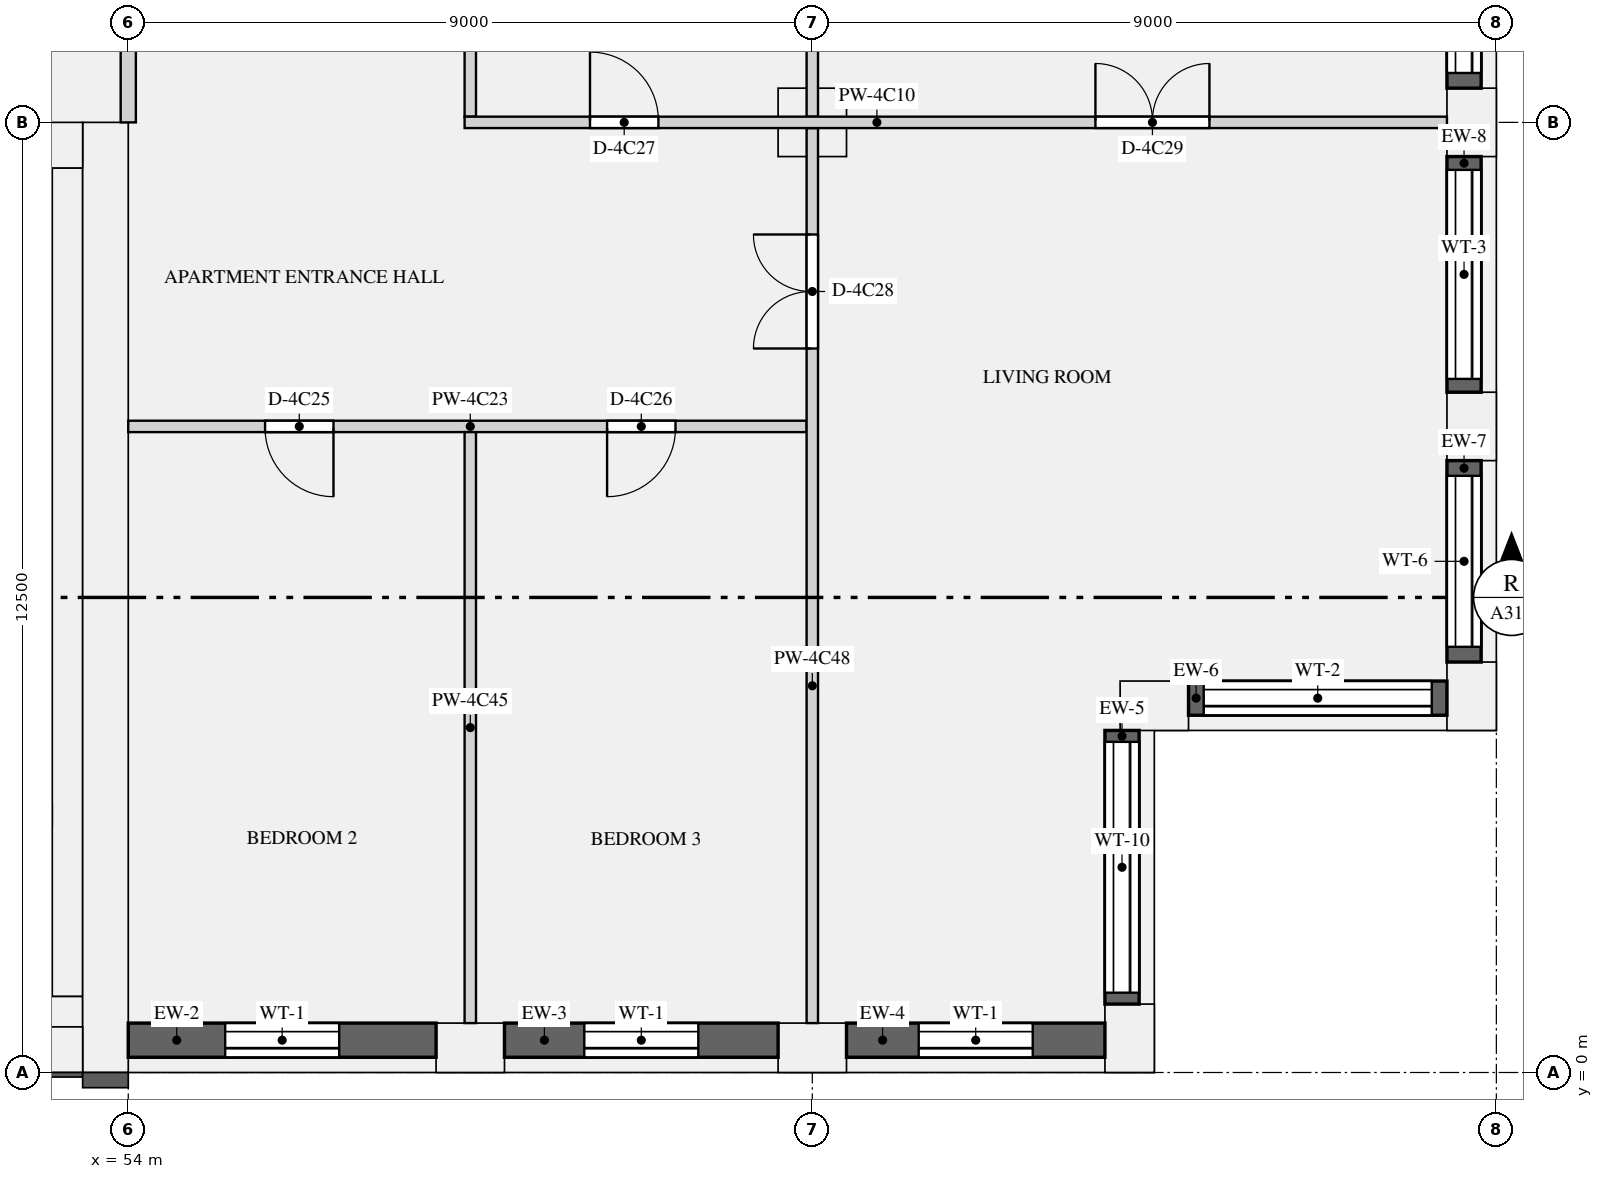
"""IFC4 building model, lengths in metres.
Left out: names, types, materials, properties, quantities, classifications, styles, units other than length and angle.
Written with IfcOpenShell. Run it as: python <this file> out.ifc"""

import sys

from ifc_helpers import new_model, si_unit, direction, frame, frame_2d, origin, origin_2d, place, context, subcontext, project, spatial, rectangle, extrude, element, fill, save


model = new_model("IFC4")
c1 = context("Model", 3, precision=1e-05, world=origin(), true_north=direction((0.0, 1.0)))
c2 = subcontext(c1, "Body", "Model", "MODEL_VIEW")
j1 = project(units=[si_unit("LENGTHUNIT", "METRE"), si_unit("PLANEANGLEUNIT", "RADIAN")], contexts=[c1])
p1 = place(None, origin())
s1 = spatial("IfcSite", under=j1, at=p1, CompositionType="ELEMENT")
p2 = place(p1, origin())
s2 = spatial("IfcBuilding", under=s1, at=p2, CompositionType="ELEMENT")
p3 = place(p2, frame((0.0, 0.0, 216.9)))
s3 = spatial("IfcBuildingStorey", under=s2, at=p3, CompositionType="ELEMENT", Elevation=216.9)
for number, where, z_axis, x_axis in (
    (1, (58.5, 0.325, 0.0), (0.0, 0.0, 1.0), (1.0, 0.0, 0.0)),
    (2, (63.0, 0.325, 0.0), (0.0, 0.0, 1.0), (1.0, 0.0, 0.0)),
    (3, (67.175, 0.45, 0.0), (0.0, 0.0, 1.0), (0.0, 1.0, 0.0)),
    (4, (67.5, 4.825, 0.0), (0.0, 0.0, 1.0), (1.0, 0.0, 0.0)),
    (5, (71.675, 4.95, 0.0), (0.0, 0.0, 1.0), (0.0, 1.0, 0.0)),
    (6, (71.675, 8.5, 0.0), (0.0, 0.0, 1.0), (0.0, 1.0, 0.0)),
    (7, (71.675, 12.5, 0.0), (0.0, 0.0, 1.0), (0.0, 1.0, 0.0)),
):
    element("IfcColumn", number, at=place(p3, frame(where, z_axis=z_axis, x_axis=x_axis)), inside=s3, PredefinedType="USERDEFINED", context=c2, shape_type="SweptSolid", body=[
        extrude(rectangle(XDim=0.9, YDim=0.65, at=origin_2d()), origin(), (0.0, 0.0, 1.0), 3.15),
    ])
p4 = place(p3, frame((63.0, 12.5, 0.0), z_axis=(0.0, 0.0, 1.0), x_axis=(1.0, 0.0, 0.0)))
e8 = element("IfcColumn", 8, at=p4, inside=s3, PredefinedType="COLUMN", context=c2, shape_type="SweptSolid", body=[
    extrude(rectangle(XDim=0.9, YDim=0.9, at=origin_2d()), origin(), (0.0, 0.0, 1.0), 3.15),
])
p5 = place(p3, frame((53.7, 0.0, 0.0), z_axis=(0.0, 0.0, 1.0), x_axis=(0.0, 1.0, 0.0)))
e9 = element("IfcWall", 9, at=p5, inside=s3, PredefinedType="SHEAR", context=c2, shape_type="SweptSolid", body=[
    extrude(rectangle(XDim=12.5, YDim=0.6, at=frame_2d((6.25, 0.0))), origin(), (0.0, 0.0, 1.0), 3.15),
])
p6 = place(p3, frame((18.6, 0.3, 0.0), z_axis=(0.0, 0.0, 1.0), x_axis=(1.0, 0.0, 0.0)))
e10 = element("IfcWall", 10, at=p6, inside=s3, PredefinedType="SHEAR", context=c2, shape_type="SweptSolid", body=[
    extrude(rectangle(XDim=34.8, YDim=0.6, at=frame_2d((17.4, 0.0))), origin(), (0.0, 0.0, 1.0), 3.15),
])
p7 = place(p3, frame((18.6, 12.2, 0.0), z_axis=(0.0, 0.0, 1.0), x_axis=(1.0, 0.0, 0.0)))
e11 = element("IfcWall", 11, at=p7, inside=s3, PredefinedType="SHEAR", context=c2, shape_type="SweptSolid", body=[
    extrude(rectangle(XDim=34.8, YDim=0.6, at=frame_2d((17.4, 0.0))), origin(), (0.0, 0.0, 1.0), 3.15),
])
p8 = place(p7, frame((24.575, 0.0, 0.0)))
e12 = element("IfcOpeningElement", 12, at=p8, cuts=e11, PredefinedType="OPENING", context=c2, shape_type="SweptSolid", body=[
    extrude(rectangle(XDim=1.1, YDim=2.1, at=frame_2d((0.55, 1.05))), frame((0.0, 0.31, 0.0), z_axis=(0.0, -1.0, 0.0), x_axis=(1.0, 0.0, 0.0)), (0.0, 0.0, 1.0), 0.62),
])
p9 = place(p7, frame((26.825, 0.0, 0.0)))
e13 = element("IfcOpeningElement", 13, at=p9, cuts=e11, PredefinedType="OPENING", context=c2, shape_type="SweptSolid", body=[
    extrude(rectangle(XDim=1.1, YDim=2.1, at=frame_2d((0.55, 1.05))), frame((0.0, 0.31, 0.0), z_axis=(0.0, -1.0, 0.0), x_axis=(1.0, 0.0, 0.0)), (0.0, 0.0, 1.0), 0.62),
])
p10 = place(p7, frame((29.075, 0.0, 0.0)))
e14 = element("IfcOpeningElement", 14, at=p10, cuts=e11, PredefinedType="OPENING", context=c2, shape_type="SweptSolid", body=[
    extrude(rectangle(XDim=1.1, YDim=2.1, at=frame_2d((0.55, 1.05))), frame((0.0, 0.31, 0.0), z_axis=(0.0, -1.0, 0.0), x_axis=(1.0, 0.0, 0.0)), (0.0, 0.0, 1.0), 0.62),
])
p11 = place(p7, frame((8.95, 0.0, 0.0)))
e15 = element("IfcOpeningElement", 15, at=p11, cuts=e11, PredefinedType="OPENING", context=c2, shape_type="SweptSolid", body=[
    extrude(rectangle(XDim=0.9, YDim=2.1, at=frame_2d((0.45, 1.05))), frame((0.0, 0.31, 0.0), z_axis=(0.0, -1.0, 0.0), x_axis=(1.0, 0.0, 0.0)), (0.0, 0.0, 1.0), 0.62),
])
p12 = place(p7, frame((1.55, 0.0, 0.0)))
e16 = element("IfcOpeningElement", 16, at=p12, cuts=e11, PredefinedType="OPENING", context=c2, shape_type="SweptSolid", body=[
    extrude(rectangle(XDim=1.2, YDim=2.1, at=frame_2d((0.6, 1.05))), frame((0.0, 0.31, 0.0), z_axis=(0.0, -1.0, 0.0), x_axis=(1.0, 0.0, 0.0)), (0.0, 0.0, 1.0), 0.62),
])
p13 = place(p7, frame((32.05, 0.0, 0.0)))
e17 = element("IfcOpeningElement", 17, at=p13, cuts=e11, PredefinedType="OPENING", context=c2, shape_type="SweptSolid", body=[
    extrude(rectangle(XDim=1.2, YDim=2.1, at=frame_2d((0.6, 1.05))), frame((0.0, 0.31, 0.0), z_axis=(0.0, -1.0, 0.0), x_axis=(1.0, 0.0, 0.0)), (0.0, 0.0, 1.0), 0.62),
])
p14 = place(p3, frame((53.2, 1.0, 0.0), z_axis=(0.0, 0.0, 1.0), x_axis=(0.0, 1.0, 0.0)))
e18 = element("IfcWall", 18, at=p14, inside=s3, PredefinedType="SHEAR", context=c2, shape_type="SweptSolid", body=[
    extrude(rectangle(XDim=10.9, YDim=0.4, at=frame_2d((5.45, 0.0))), origin(), (0.0, 0.0, 1.0), 3.15),
])
p15 = place(p3, frame((18.6, 0.8, 0.0), z_axis=(0.0, 0.0, 1.0), x_axis=(1.0, 0.0, 0.0)))
e19 = element("IfcWall", 19, at=p15, inside=s3, PredefinedType="SHEAR", context=c2, shape_type="SweptSolid", body=[
    extrude(rectangle(XDim=34.8, YDim=0.4, at=frame_2d((17.4, 0.0))), origin(), (0.0, 0.0, 1.0), 3.15),
])
p16 = place(p3, frame((54.0, 0.425, 0.9), z_axis=(0.0, 0.0, 1.0), x_axis=(1.0, 0.0, 0.0)))
e20 = element("IfcWall", 20, at=p16, inside=s3, PredefinedType="SOLIDWALL", context=c2, shape_type="SweptSolid", body=[
    extrude(rectangle(XDim=4.05, YDim=0.45, at=frame_2d((2.025, 0.0))), origin(), (0.0, 0.0, 1.0), 1.93),
])
p17 = place(p16, frame((1.275, 0.0, 0.15)))
e21 = element("IfcOpeningElement", 21, at=p17, cuts=e20, PredefinedType="OPENING", context=c2, shape_type="SweptSolid", body=[
    extrude(rectangle(XDim=1.5, YDim=1.5, at=frame_2d((0.75, 0.75))), frame((0.0, 0.235, 0.0), z_axis=(0.0, -1.0, 0.0), x_axis=(1.0, 0.0, 0.0)), (0.0, 0.0, 1.0), 0.47),
])
p18 = place(p3, frame((58.95, 0.425, 0.9), z_axis=(0.0, 0.0, 1.0), x_axis=(1.0, 0.0, 0.0)))
e22 = element("IfcWall", 22, at=p18, inside=s3, PredefinedType="SOLIDWALL", context=c2, shape_type="SweptSolid", body=[
    extrude(rectangle(XDim=3.6, YDim=0.45, at=frame_2d((1.8, 0.0))), origin(), (0.0, 0.0, 1.0), 1.93),
])
p19 = place(p18, frame((1.05, 0.0, 0.15)))
e23 = element("IfcOpeningElement", 23, at=p19, cuts=e22, PredefinedType="OPENING", context=c2, shape_type="SweptSolid", body=[
    extrude(rectangle(XDim=1.5, YDim=1.5, at=frame_2d((0.75, 0.75))), frame((0.0, 0.235, 0.0), z_axis=(0.0, -1.0, 0.0), x_axis=(1.0, 0.0, 0.0)), (0.0, 0.0, 1.0), 0.47),
])
p20 = place(p3, frame((63.45, 0.425, 0.9), z_axis=(0.0, 0.0, 1.0), x_axis=(1.0, 0.0, 0.0)))
e24 = element("IfcWall", 24, at=p20, inside=s3, PredefinedType="SOLIDWALL", context=c2, shape_type="SweptSolid", body=[
    extrude(rectangle(XDim=3.4, YDim=0.45, at=frame_2d((1.7, 0.0))), origin(), (0.0, 0.0, 1.0), 1.93),
])
p21 = place(p20, frame((0.95, 0.0, 0.15)))
e25 = element("IfcOpeningElement", 25, at=p21, cuts=e24, PredefinedType="OPENING", context=c2, shape_type="SweptSolid", body=[
    extrude(rectangle(XDim=1.5, YDim=1.5, at=frame_2d((0.75, 0.75))), frame((0.0, 0.235, 0.0), z_axis=(0.0, -1.0, 0.0), x_axis=(1.0, 0.0, 0.0)), (0.0, 0.0, 1.0), 0.47),
])
p22 = place(p3, frame((67.075, 0.9, 0.9), z_axis=(0.0, 0.0, 1.0), x_axis=(0.0, 1.0, 0.0)))
e26 = element("IfcWall", 26, at=p22, inside=s3, PredefinedType="SOLIDWALL", context=c2, shape_type="SweptSolid", body=[
    extrude(rectangle(XDim=3.6, YDim=0.45, at=frame_2d((1.8, 0.0))), origin(), (0.0, 0.0, 1.0), 1.93),
])
p23 = place(p22, frame((0.15, 0.0, 0.15)))
e27 = element("IfcOpeningElement", 27, at=p23, cuts=e26, PredefinedType="OPENING", context=c2, shape_type="SweptSolid", body=[
    extrude(rectangle(XDim=3.3, YDim=1.5, at=frame_2d((1.65, 0.75))), frame((0.0, 0.235, 0.0), z_axis=(0.0, -1.0, 0.0), x_axis=(1.0, 0.0, 0.0)), (0.0, 0.0, 1.0), 0.47),
])
p24 = place(p3, frame((67.95, 4.925, 0.9), z_axis=(0.0, 0.0, 1.0), x_axis=(1.0, 0.0, 0.0)))
e28 = element("IfcWall", 28, at=p24, inside=s3, PredefinedType="SOLIDWALL", context=c2, shape_type="SweptSolid", body=[
    extrude(rectangle(XDim=3.4, YDim=0.45, at=frame_2d((1.7, 0.0))), origin(), (0.0, 0.0, 1.0), 1.93),
])
p25 = place(p24, frame((0.2, 0.0, 0.15)))
e29 = element("IfcOpeningElement", 29, at=p25, cuts=e28, PredefinedType="OPENING", context=c2, shape_type="SweptSolid", body=[
    extrude(rectangle(XDim=3.0, YDim=1.5, at=frame_2d((1.5, 0.75))), frame((0.0, 0.235, 0.0), z_axis=(0.0, -1.0, 0.0), x_axis=(1.0, 0.0, 0.0)), (0.0, 0.0, 1.0), 0.47),
])
p26 = place(p3, frame((71.575, 5.4, 0.9), z_axis=(0.0, 0.0, 1.0), x_axis=(0.0, 1.0, 0.0)))
e30 = element("IfcWall", 30, at=p26, inside=s3, PredefinedType="SOLIDWALL", context=c2, shape_type="SweptSolid", body=[
    extrude(rectangle(XDim=2.65, YDim=0.45, at=frame_2d((1.325, 0.0))), origin(), (0.0, 0.0, 1.0), 1.93),
])
p27 = place(p26, frame((0.2, 0.0, 0.15)))
e31 = element("IfcOpeningElement", 31, at=p27, cuts=e30, PredefinedType="OPENING", context=c2, shape_type="SweptSolid", body=[
    extrude(rectangle(XDim=2.25, YDim=1.5, at=frame_2d((1.125, 0.75))), frame((0.0, 0.235, 0.0), z_axis=(0.0, -1.0, 0.0), x_axis=(1.0, 0.0, 0.0)), (0.0, 0.0, 1.0), 0.47),
])
p28 = place(p3, frame((71.575, 8.95, 0.9), z_axis=(0.0, 0.0, 1.0), x_axis=(0.0, 1.0, 0.0)))
e32 = element("IfcWall", 32, at=p28, inside=s3, PredefinedType="SOLIDWALL", context=c2, shape_type="SweptSolid", body=[
    extrude(rectangle(XDim=3.1, YDim=0.45, at=frame_2d((1.55, 0.0))), origin(), (0.0, 0.0, 1.0), 1.93),
])
p29 = place(p28, frame((0.175, 0.0, 0.15)))
e33 = element("IfcOpeningElement", 33, at=p29, cuts=e32, PredefinedType="OPENING", context=c2, shape_type="SweptSolid", body=[
    extrude(rectangle(XDim=2.75, YDim=1.5, at=frame_2d((1.375, 0.75))), frame((0.0, 0.235, 0.0), z_axis=(0.0, -1.0, 0.0), x_axis=(1.0, 0.0, 0.0)), (0.0, 0.0, 1.0), 0.47),
])
p30 = place(p3, frame((71.575, 12.95, 0.9), z_axis=(0.0, 0.0, 1.0), x_axis=(0.0, 1.0, 0.0)))
e34 = element("IfcWall", 34, at=p30, inside=s3, PredefinedType="SOLIDWALL", context=c2, shape_type="SweptSolid", body=[
    extrude(rectangle(XDim=2.9, YDim=0.45, at=frame_2d((1.45, 0.0))), origin(), (0.0, 0.0, 1.0), 1.93),
])
p31 = place(p30, frame((0.2, 0.0, 0.15)))
e35 = element("IfcOpeningElement", 35, at=p31, cuts=e34, PredefinedType="OPENING", context=c2, shape_type="SweptSolid", body=[
    extrude(rectangle(XDim=2.5, YDim=1.5, at=frame_2d((1.25, 0.75))), frame((0.0, 0.235, 0.0), z_axis=(0.0, -1.0, 0.0), x_axis=(1.0, 0.0, 0.0)), (0.0, 0.0, 1.0), 0.47),
])
p32 = place(p3, frame((54.0, 12.5, 0.0), z_axis=(0.0, 0.0, 1.0), x_axis=(0.0, 1.0, 0.0)))
e36 = element("IfcWall", 36, at=p32, inside=s3, PredefinedType="PARTITIONING", context=c2, shape_type="SweptSolid", body=[
    extrude(rectangle(XDim=3.4, YDim=0.2, at=frame_2d((1.7, 0.0))), origin(), (0.0, 0.0, 1.0), 2.83),
])
p33 = place(p3, frame((58.425, 12.5, 0.0), z_axis=(0.0, 0.0, 1.0), x_axis=(1.0, 0.0, 0.0)))
e37 = element("IfcWall", 37, at=p33, inside=s3, PredefinedType="PARTITIONING", context=c2, shape_type="SweptSolid", body=[
    extrude(rectangle(XDim=12.925, YDim=0.15, at=frame_2d((6.462, 0.0))), origin(), (0.0, 0.0, 1.0), 2.83),
])
p34 = place(p33, frame((1.65, 0.0, 0.0)))
e38 = element("IfcOpeningElement", 38, at=p34, cuts=e37, PredefinedType="OPENING", context=c2, shape_type="SweptSolid", body=[
    extrude(rectangle(XDim=0.9, YDim=2.1, at=frame_2d((0.45, 1.05))), frame((0.0, 0.085, 0.0), z_axis=(0.0, -1.0, 0.0), x_axis=(1.0, 0.0, 0.0)), (0.0, 0.0, 1.0), 0.17),
])
p35 = place(p33, frame((8.3, 0.0, 0.0)))
e39 = element("IfcOpeningElement", 39, at=p35, cuts=e37, PredefinedType="OPENING", context=c2, shape_type="SweptSolid", body=[
    extrude(rectangle(XDim=1.5, YDim=2.1, at=frame_2d((0.75, 1.05))), frame((0.0, 0.085, 0.0), z_axis=(0.0, -1.0, 0.0), x_axis=(1.0, 0.0, 0.0)), (0.0, 0.0, 1.0), 0.17),
])
p36 = place(p3, frame((54.0, 8.5, 0.0), z_axis=(0.0, 0.0, 1.0), x_axis=(1.0, 0.0, 0.0)))
e40 = element("IfcWall", 40, at=p36, inside=s3, PredefinedType="PARTITIONING", context=c2, shape_type="SweptSolid", body=[
    extrude(rectangle(XDim=8.925, YDim=0.15, at=frame_2d((4.462, 0.0))), origin(), (0.0, 0.0, 1.0), 2.83),
])
p37 = place(p36, frame((1.8, 0.0, 0.0)))
e41 = element("IfcOpeningElement", 41, at=p37, cuts=e40, PredefinedType="OPENING", context=c2, shape_type="SweptSolid", body=[
    extrude(rectangle(XDim=0.9, YDim=2.1, at=frame_2d((0.45, 1.05))), frame((0.0, 0.085, 0.0), z_axis=(0.0, -1.0, 0.0), x_axis=(1.0, 0.0, 0.0)), (0.0, 0.0, 1.0), 0.17),
])
p38 = place(p36, frame((6.3, 0.0, 0.0)))
e42 = element("IfcOpeningElement", 42, at=p38, cuts=e40, PredefinedType="OPENING", context=c2, shape_type="SweptSolid", body=[
    extrude(rectangle(XDim=0.9, YDim=2.1, at=frame_2d((0.45, 1.05))), frame((0.0, 0.085, 0.0), z_axis=(0.0, -1.0, 0.0), x_axis=(1.0, 0.0, 0.0)), (0.0, 0.0, 1.0), 0.17),
])
p39 = place(p3, frame((58.5, 0.65, 0.0), z_axis=(0.0, 0.0, 1.0), x_axis=(0.0, 1.0, 0.0)))
e43 = element("IfcWall", 43, at=p39, inside=s3, PredefinedType="PARTITIONING", context=c2, shape_type="SweptSolid", body=[
    extrude(rectangle(XDim=7.775, YDim=0.15, at=frame_2d((3.888, 0.0))), origin(), (0.0, 0.0, 1.0), 2.83),
])
p40 = place(p3, frame((58.5, 12.575, 0.0), z_axis=(0.0, 0.0, 1.0), x_axis=(0.0, 1.0, 0.0)))
e44 = element("IfcWall", 44, at=p40, inside=s3, PredefinedType="PARTITIONING", context=c2, shape_type="SweptSolid", body=[
    extrude(rectangle(XDim=3.85, YDim=0.15, at=frame_2d((1.925, 0.0))), origin(), (0.0, 0.0, 1.0), 2.83),
])
p41 = place(p3, frame((63.0, 0.65, 0.0), z_axis=(0.0, 0.0, 1.0), x_axis=(0.0, 1.0, 0.0)))
e45 = element("IfcWall", 45, at=p41, inside=s3, PredefinedType="PARTITIONING", context=c2, shape_type="SweptSolid", body=[
    extrude(rectangle(XDim=11.775, YDim=0.15, at=frame_2d((5.888, 0.0))), origin(), (0.0, 0.0, 1.0), 2.83),
])
p42 = place(p41, frame((8.875, 0.0, 0.0)))
e46 = element("IfcOpeningElement", 46, at=p42, cuts=e45, PredefinedType="OPENING", context=c2, shape_type="SweptSolid", body=[
    extrude(rectangle(XDim=1.5, YDim=2.1, at=frame_2d((0.75, 1.05))), frame((0.0, 0.085, 0.0), z_axis=(0.0, -1.0, 0.0), x_axis=(1.0, 0.0, 0.0)), (0.0, 0.0, 1.0), 0.17),
])
p43 = place(p3, frame((63.0, 12.575, 0.0), z_axis=(0.0, 0.0, 1.0), x_axis=(0.0, 1.0, 0.0)))
e47 = element("IfcWall", 47, at=p43, inside=s3, PredefinedType="PARTITIONING", context=c2, shape_type="SweptSolid", body=[
    extrude(rectangle(XDim=3.85, YDim=0.15, at=frame_2d((1.925, 0.0))), origin(), (0.0, 0.0, 1.0), 2.83),
])
p44 = place(p17, origin())
e48 = element("IfcWindow", 48, at=p44, inside=s3, PartitioningType="SINGLE_PANEL", PredefinedType="WINDOW", context=c2, shape_type="SweptSolid", body=[
    extrude(rectangle(XDim=1.5, YDim=1.5, at=frame_2d((0.75, 0.75))), frame((0.0, -0.065, 0.0), z_axis=(0.0, -1.0, 0.0), x_axis=(1.0, 0.0, 0.0)), (0.0, 0.0, 1.0), 0.06),
])
fill(e21, e48)
p45 = place(p19, origin())
e49 = element("IfcWindow", 49, at=p45, inside=s3, PartitioningType="SINGLE_PANEL", PredefinedType="WINDOW", context=c2, shape_type="SweptSolid", body=[
    extrude(rectangle(XDim=1.5, YDim=1.5, at=frame_2d((0.75, 0.75))), frame((0.0, -0.065, 0.0), z_axis=(0.0, -1.0, 0.0), x_axis=(1.0, 0.0, 0.0)), (0.0, 0.0, 1.0), 0.06),
])
fill(e23, e49)
p46 = place(p21, origin())
e50 = element("IfcWindow", 50, at=p46, inside=s3, PartitioningType="SINGLE_PANEL", PredefinedType="WINDOW", context=c2, shape_type="SweptSolid", body=[
    extrude(rectangle(XDim=1.5, YDim=1.5, at=frame_2d((0.75, 0.75))), frame((0.0, -0.065, 0.0), z_axis=(0.0, -1.0, 0.0), x_axis=(1.0, 0.0, 0.0)), (0.0, 0.0, 1.0), 0.06),
])
fill(e25, e50)
p47 = place(p23, origin())
e51 = element("IfcWindow", 51, at=p47, inside=s3, PartitioningType="SINGLE_PANEL", PredefinedType="WINDOW", context=c2, shape_type="SweptSolid", body=[
    extrude(rectangle(XDim=3.3, YDim=1.5, at=frame_2d((1.65, 0.75))), frame((0.0, -0.065, 0.0), z_axis=(0.0, -1.0, 0.0), x_axis=(1.0, 0.0, 0.0)), (0.0, 0.0, 1.0), 0.06),
])
fill(e27, e51)
p48 = place(p25, origin())
e52 = element("IfcWindow", 52, at=p48, inside=s3, PartitioningType="SINGLE_PANEL", PredefinedType="WINDOW", context=c2, shape_type="SweptSolid", body=[
    extrude(rectangle(XDim=3.0, YDim=1.5, at=frame_2d((1.5, 0.75))), frame((0.0, -0.065, 0.0), z_axis=(0.0, -1.0, 0.0), x_axis=(1.0, 0.0, 0.0)), (0.0, 0.0, 1.0), 0.06),
])
fill(e29, e52)
p49 = place(p27, origin())
e53 = element("IfcWindow", 53, at=p49, inside=s3, PartitioningType="SINGLE_PANEL", PredefinedType="WINDOW", context=c2, shape_type="SweptSolid", body=[
    extrude(rectangle(XDim=2.25, YDim=1.5, at=frame_2d((1.125, 0.75))), frame((0.0, -0.065, 0.0), z_axis=(0.0, -1.0, 0.0), x_axis=(1.0, 0.0, 0.0)), (0.0, 0.0, 1.0), 0.06),
])
fill(e31, e53)
p50 = place(p29, origin())
e54 = element("IfcWindow", 54, at=p50, inside=s3, PartitioningType="SINGLE_PANEL", PredefinedType="WINDOW", context=c2, shape_type="SweptSolid", body=[
    extrude(rectangle(XDim=2.75, YDim=1.5, at=frame_2d((1.375, 0.75))), frame((0.0, -0.065, 0.0), z_axis=(0.0, -1.0, 0.0), x_axis=(1.0, 0.0, 0.0)), (0.0, 0.0, 1.0), 0.06),
])
fill(e33, e54)
p51 = place(p31, origin())
e55 = element("IfcWindow", 55, at=p51, inside=s3, PartitioningType="SINGLE_PANEL", PredefinedType="WINDOW", context=c2, shape_type="SweptSolid", body=[
    extrude(rectangle(XDim=2.5, YDim=1.5, at=frame_2d((1.25, 0.75))), frame((0.0, -0.065, 0.0), z_axis=(0.0, -1.0, 0.0), x_axis=(1.0, 0.0, 0.0)), (0.0, 0.0, 1.0), 0.06),
])
fill(e35, e55)
p52 = place(p37, frame((0.9, 0.0, 0.0), z_axis=(0.0, 0.0, 1.0), x_axis=(-1.0, 0.0, 0.0)))
e56 = element("IfcDoor", 56, at=p52, inside=s3, OperationType="SINGLE_SWING_LEFT", PredefinedType="DOOR", context=c2, shape_type="SweptSolid", body=[
    extrude(rectangle(XDim=0.9, YDim=2.1, at=frame_2d((0.45, 1.05))), frame((0.0, 0.025, 0.0), z_axis=(0.0, -1.0, 0.0), x_axis=(1.0, 0.0, 0.0)), (0.0, 0.0, 1.0), 0.05),
])
fill(e41, e56)
p53 = place(p38, frame((0.9, 0.0, 0.0), z_axis=(0.0, 0.0, 1.0), x_axis=(-1.0, 0.0, 0.0)))
e57 = element("IfcDoor", 57, at=p53, inside=s3, OperationType="SINGLE_SWING_RIGHT", PredefinedType="DOOR", context=c2, shape_type="SweptSolid", body=[
    extrude(rectangle(XDim=0.9, YDim=2.1, at=frame_2d((0.45, 1.05))), frame((0.0, 0.025, 0.0), z_axis=(0.0, -1.0, 0.0), x_axis=(1.0, 0.0, 0.0)), (0.0, 0.0, 1.0), 0.05),
])
fill(e42, e57)
p54 = place(p34, origin())
e58 = element("IfcDoor", 58, at=p54, inside=s3, OperationType="SINGLE_SWING_LEFT", PredefinedType="DOOR", context=c2, shape_type="SweptSolid", body=[
    extrude(rectangle(XDim=0.9, YDim=2.1, at=frame_2d((0.45, 1.05))), frame((0.0, 0.025, 0.0), z_axis=(0.0, -1.0, 0.0), x_axis=(1.0, 0.0, 0.0)), (0.0, 0.0, 1.0), 0.05),
])
fill(e38, e58)
p55 = place(p42, origin())
e59 = element("IfcDoor", 59, at=p55, inside=s3, OperationType="DOUBLE_DOOR_SINGLE_SWING", PredefinedType="DOOR", context=c2, shape_type="SweptSolid", body=[
    extrude(rectangle(XDim=1.5, YDim=2.1, at=frame_2d((0.75, 1.05))), frame((0.0, 0.025, 0.0), z_axis=(0.0, -1.0, 0.0), x_axis=(1.0, 0.0, 0.0)), (0.0, 0.0, 1.0), 0.05),
])
fill(e46, e59)
p56 = place(p35, origin())
e60 = element("IfcDoor", 60, at=p56, inside=s3, OperationType="DOUBLE_DOOR_SINGLE_SWING", PredefinedType="DOOR", context=c2, shape_type="SweptSolid", body=[
    extrude(rectangle(XDim=1.5, YDim=2.1, at=frame_2d((0.75, 1.05))), frame((0.0, 0.025, 0.0), z_axis=(0.0, -1.0, 0.0), x_axis=(1.0, 0.0, 0.0)), (0.0, 0.0, 1.0), 0.05),
])
fill(e39, e60)
save(model, sys.argv[1])
